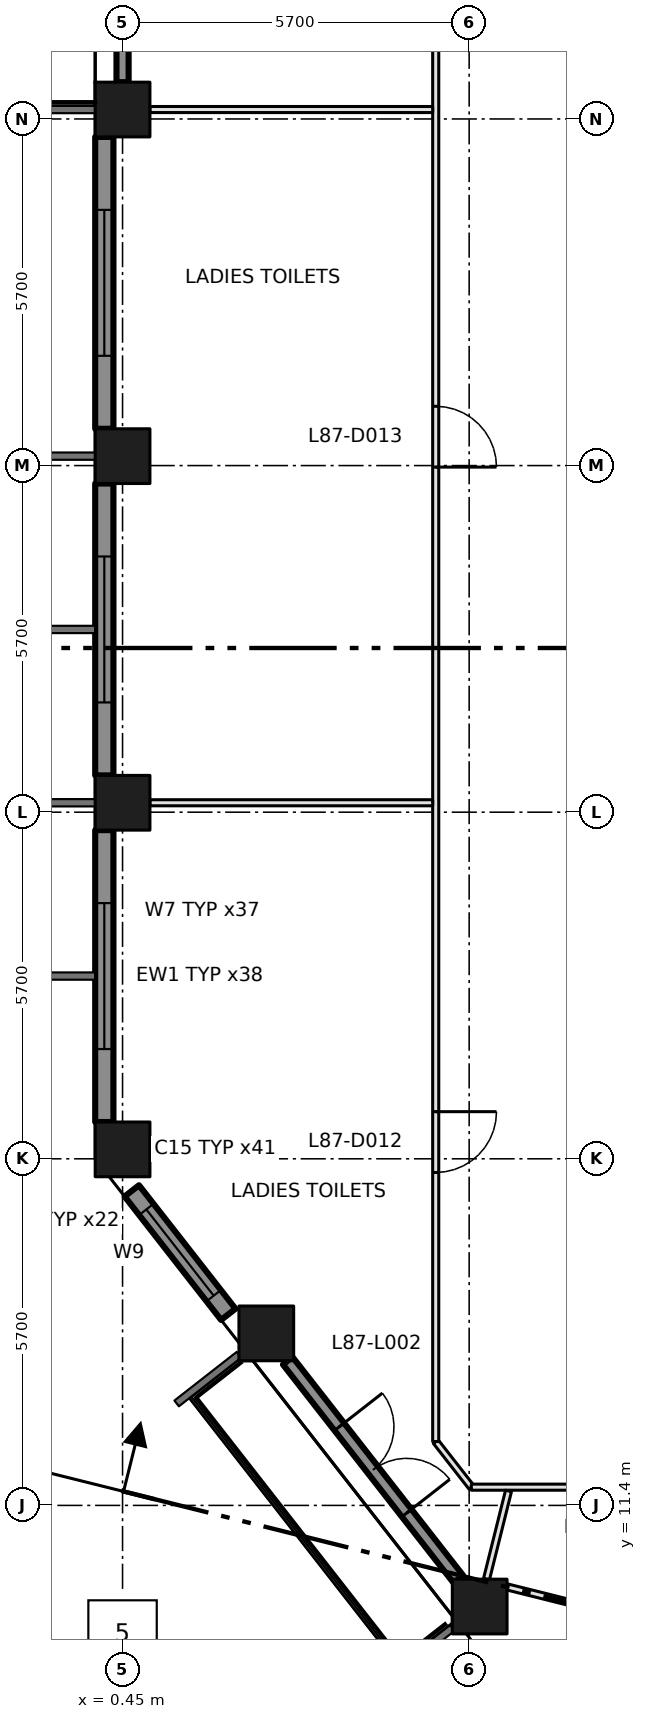
"""IFC4 building model, lengths in metres.
Left out: names, types, materials, properties, quantities, classifications, styles, units other than length and angle.
Written with IfcOpenShell. Run it as: python <this file> out.ifc"""

import sys

from ifc_helpers import new_model, si_unit, direction, frame, frame_2d, origin, origin_2d, place, context, subcontext, project, spatial, rectangle, extrude, element, fill, save


model = new_model("IFC4")
c1 = context("Model", 3, precision=1e-05, world=origin(), true_north=direction((0.0, 1.0)))
c2 = subcontext(c1, "Body", "Model", "MODEL_VIEW")
j1 = project(units=[si_unit("LENGTHUNIT", "METRE"), si_unit("PLANEANGLEUNIT", "RADIAN")], contexts=[c1])
p1 = place(None, origin())
s1 = spatial("IfcSite", under=j1, at=p1, CompositionType="ELEMENT")
p2 = place(p1, origin())
s2 = spatial("IfcBuilding", under=s1, at=p2, CompositionType="ELEMENT")
p3 = place(p2, frame((0.0, 0.0, 379.2)))
s3 = spatial("IfcBuildingStorey", under=s2, at=p3, CompositionType="ELEMENT", Elevation=379.2)
for number, where, z_axis, x_axis in (
    (1, (0.45, 17.255, 0.0), (0.0, 0.0, 1.0), (1.0, 0.0, 0.0)),
    (2, (0.45, 22.955, 0.0), (0.0, 0.0, 1.0), (1.0, 0.0, 0.0)),
    (3, (0.45, 28.655, 0.0), (0.0, 0.0, 1.0), (1.0, 0.0, 0.0)),
    (4, (0.45, 34.355, 0.0), (0.0, 0.0, 1.0), (1.0, 0.0, 0.0)),
    (5, (6.323, 9.737, 0.0), (0.0, 0.0, 1.0), (1.0, 0.0, 0.0)),
    (6, (2.814, 14.229, 0.0), (0.0, 0.0, 1.0), (1.0, 0.0, 0.0)),
):
    element("IfcColumn", number, at=place(p3, frame(where, z_axis=z_axis, x_axis=x_axis)), inside=s3, PredefinedType="COLUMN", context=c2, shape_type="SweptSolid", body=[
        extrude(rectangle(XDim=0.9, YDim=0.9, at=origin_2d()), origin(), (0.0, 0.0, 1.0), 4.2),
    ])
p4 = place(p3, frame((0.45, 39.605, 0.0), z_axis=(0.0, 0.0, 1.0), x_axis=(0.0, -1.0, 0.0)))
e7 = element("IfcWall", 7, at=p4, inside=s3, PredefinedType="SOLIDWALL", context=c2, shape_type="SweptSolid", body=[
    extrude(rectangle(XDim=4.8, YDim=0.2, at=frame_2d((2.4, 0.0))), origin(), (0.0, 0.0, 1.0), 3.2),
])
p5 = place(p4, frame((1.5, 0.0, 0.0)))
e8 = element("IfcOpeningElement", 8, at=p5, cuts=e7, PredefinedType="OPENING", context=c2, shape_type="SweptSolid", body=[
    extrude(rectangle(XDim=1.8, YDim=2.9, at=frame_2d((0.9, 1.45))), frame((0.0, 0.11, 0.0), z_axis=(0.0, -1.0, 0.0), x_axis=(1.0, 0.0, 0.0)), (0.0, 0.0, 1.0), 0.22),
])
p6 = place(p3, frame((0.15, 33.905, 0.0), z_axis=(0.0, 0.0, 1.0), x_axis=(0.0, -1.0, 0.0)))
e9 = element("IfcWall", 9, at=p6, inside=s3, PredefinedType="SOLIDWALL", context=c2, shape_type="SweptSolid", body=[
    extrude(rectangle(XDim=4.8, YDim=0.3, at=frame_2d((2.4, 0.0))), origin(), (0.0, 0.0, 1.0), 3.2),
])
p7 = place(p6, frame((1.2, 0.0, 0.8)))
e10 = element("IfcOpeningElement", 10, at=p7, cuts=e9, PredefinedType="OPENING", context=c2, shape_type="SweptSolid", body=[
    extrude(rectangle(XDim=2.4, YDim=2.1, at=frame_2d((1.2, 1.05))), frame((0.0, 0.16, 0.0), z_axis=(0.0, -1.0, 0.0), x_axis=(1.0, 0.0, 0.0)), (0.0, 0.0, 1.0), 0.32),
])
p8 = place(p3, frame((0.15, 28.205, 0.0), z_axis=(0.0, 0.0, 1.0), x_axis=(0.0, -1.0, 0.0)))
e11 = element("IfcWall", 11, at=p8, inside=s3, PredefinedType="SOLIDWALL", context=c2, shape_type="SweptSolid", body=[
    extrude(rectangle(XDim=4.8, YDim=0.3, at=frame_2d((2.4, 0.0))), origin(), (0.0, 0.0, 1.0), 3.2),
])
p9 = place(p8, frame((1.2, 0.0, 0.8)))
e12 = element("IfcOpeningElement", 12, at=p9, cuts=e11, PredefinedType="OPENING", context=c2, shape_type="SweptSolid", body=[
    extrude(rectangle(XDim=2.4, YDim=2.1, at=frame_2d((1.2, 1.05))), frame((0.0, 0.16, 0.0), z_axis=(0.0, -1.0, 0.0), x_axis=(1.0, 0.0, 0.0)), (0.0, 0.0, 1.0), 0.32),
])
p10 = place(p3, frame((0.15, 22.505, 0.0), z_axis=(0.0, 0.0, 1.0), x_axis=(0.0, -1.0, 0.0)))
e13 = element("IfcWall", 13, at=p10, inside=s3, PredefinedType="SOLIDWALL", context=c2, shape_type="SweptSolid", body=[
    extrude(rectangle(XDim=4.8, YDim=0.3, at=frame_2d((2.4, 0.0))), origin(), (0.0, 0.0, 1.0), 3.2),
])
p11 = place(p10, frame((1.2, 0.0, 0.8)))
e14 = element("IfcOpeningElement", 14, at=p11, cuts=e13, PredefinedType="OPENING", context=c2, shape_type="SweptSolid", body=[
    extrude(rectangle(XDim=2.4, YDim=2.1, at=frame_2d((1.2, 1.05))), frame((0.0, 0.16, 0.0), z_axis=(0.0, -1.0, 0.0), x_axis=(1.0, 0.0, 0.0)), (0.0, 0.0, 1.0), 0.32),
])
p12 = place(p3, frame((0.602, 16.573, 0.0), z_axis=(0.0, 0.0, 1.0), x_axis=(0.61568999437, -0.787988471256, 0.0)))
e15 = element("IfcWall", 15, at=p12, inside=s3, PredefinedType="SOLIDWALL", context=c2, shape_type="SweptSolid", body=[
    extrude(rectangle(XDim=2.577, YDim=0.3, at=frame_2d((1.289, 0.0))), origin(), (0.0, 0.0, 1.0), 3.2),
])
p13 = place(p12, frame((0.388, 0.0, 0.8)))
e16 = element("IfcOpeningElement", 16, at=p13, cuts=e15, PredefinedType="OPENING", context=c2, shape_type="SweptSolid", body=[
    extrude(rectangle(XDim=1.8, YDim=2.1, at=frame_2d((0.9, 1.05))), frame((0.0, 0.16, 0.0), z_axis=(0.0, -1.0, 0.0), x_axis=(1.0, 0.0, 0.0)), (0.0, 0.0, 1.0), 0.32),
])
p14 = place(p3, frame((3.166, 13.779, 0.0), z_axis=(0.0, 0.0, 1.0), x_axis=(0.615593109271, -0.788064162247, 0.0)))
e17 = element("IfcWall", 17, at=p14, inside=s3, PredefinedType="SOLIDWALL", context=c2, shape_type="SweptSolid", body=[
    extrude(rectangle(XDim=4.558, YDim=0.2, at=frame_2d((2.279, 0.0))), origin(), (0.0, 0.0, 1.0), 3.2),
])
p15 = place(p14, frame((1.378, 0.0, 0.0)))
e18 = element("IfcOpeningElement", 18, at=p15, cuts=e17, PredefinedType="OPENING", context=c2, shape_type="SweptSolid", body=[
    extrude(rectangle(XDim=1.8, YDim=2.9, at=frame_2d((0.9, 1.45))), frame((0.0, 0.11, 0.0), z_axis=(0.0, -1.0, 0.0), x_axis=(1.0, 0.0, 0.0)), (0.0, 0.0, 1.0), 0.22),
])
p16 = place(p3, frame((1.871, 13.276, 0.0), z_axis=(0.0, 0.0, 1.0), x_axis=(0.615632551218, -0.788033350741, 0.0)))
e19 = element("IfcWall", 19, at=p16, inside=s3, PredefinedType="SOLIDWALL", context=c2, shape_type="SweptSolid", body=[
    extrude(rectangle(XDim=5.36, YDim=0.4, at=frame_2d((2.68, 0.0))), origin(), (0.0, 0.0, 1.0), 0.3),
])
p17 = place(p3, frame((5.6, 12.45, 0.0), z_axis=(0.0, 0.0, 1.0), x_axis=(0.615644041972, -0.788024373725, 0.0)))
e20 = element("IfcWall", 20, at=p17, inside=s3, PredefinedType="PARTITIONING", context=c2, shape_type="SweptSolid", body=[
    extrude(rectangle(XDim=0.952, YDim=0.1, at=frame_2d((0.476, 0.0))), origin(), (0.0, 0.0, 1.0), 3.9),
])
p18 = place(p3, frame((5.6, 39.3, 0.0), z_axis=(0.0, 0.0, 1.0), x_axis=(0.0, -1.0, 0.0)))
e21 = element("IfcWall", 21, at=p18, inside=s3, PredefinedType="PARTITIONING", context=c2, shape_type="SweptSolid", body=[
    extrude(rectangle(XDim=26.85, YDim=0.1, at=frame_2d((13.425, 0.0))), origin(), (0.0, 0.0, 1.0), 3.9),
])
p19 = place(p18, frame((21.425, 0.0, 0.0)))
e22 = element("IfcOpeningElement", 22, at=p19, cuts=e21, PredefinedType="OPENING", context=c2, shape_type="SweptSolid", body=[
    extrude(rectangle(XDim=1.0, YDim=2.1, at=frame_2d((0.5, 1.05))), frame((0.0, 0.06, 0.0), z_axis=(0.0, -1.0, 0.0), x_axis=(1.0, 0.0, 0.0)), (0.0, 0.0, 1.0), 0.12),
])
p20 = place(p18, frame((9.825, 0.0, 0.0)))
e23 = element("IfcOpeningElement", 23, at=p20, cuts=e21, PredefinedType="OPENING", context=c2, shape_type="SweptSolid", body=[
    extrude(rectangle(XDim=1.0, YDim=2.1, at=frame_2d((0.5, 1.05))), frame((0.0, 0.06, 0.0), z_axis=(0.0, -1.0, 0.0), x_axis=(1.0, 0.0, 0.0)), (0.0, 0.0, 1.0), 0.12),
])
p21 = place(p3, frame((6.186, 11.7, 0.0), z_axis=(0.0, 0.0, 1.0), x_axis=(1.0, 0.0, 0.0)))
e24 = element("IfcWall", 24, at=p21, inside=s3, PredefinedType="PARTITIONING", context=c2, shape_type="SweptSolid", body=[
    extrude(rectangle(XDim=3.714, YDim=0.1, at=frame_2d((1.857, 0.0))), origin(), (0.0, 0.0, 1.0), 3.9),
])
p22 = place(p21, frame((1.791, 0.0, 0.0)))
e25 = element("IfcOpeningElement", 25, at=p22, cuts=e24, PredefinedType="OPENING", context=c2, shape_type="SweptSolid", body=[
    extrude(rectangle(XDim=1.0, YDim=2.1, at=frame_2d((0.5, 1.05))), frame((0.0, 0.06, 0.0), z_axis=(0.0, -1.0, 0.0), x_axis=(1.0, 0.0, 0.0)), (0.0, 0.0, 1.0), 0.12),
])
for number, where, z_axis, x_axis in (
    (26, (5.55, 22.955, 0.0), (0.0, 0.0, 1.0), (-1.0, 0.0, 0.0)),
    (27, (5.55, 34.355, 0.0), (0.0, 0.0, 1.0), (-1.0, 0.0, 0.0)),
):
    element("IfcWall", number, at=place(p3, frame(where, z_axis=z_axis, x_axis=x_axis)), inside=s3, PredefinedType="PARTITIONING", context=c2, shape_type="SweptSolid", body=[
        extrude(rectangle(XDim=4.65, YDim=0.1, at=frame_2d((2.325, 0.0))), origin(), (0.0, 0.0, 1.0), 3.9),
    ])
p23 = place(p3, frame((6.797, 11.638, 0.0), z_axis=(0.0, 0.0, 1.0), x_axis=(-0.242113049408, -0.970248046278, 0.0)))
e28 = element("IfcWall", 28, at=p23, inside=s3, PredefinedType="PARTITIONING", context=c2, shape_type="SweptSolid", body=[
    extrude(rectangle(XDim=1.495, YDim=0.1, at=frame_2d((0.748, 0.0))), origin(), (0.0, 0.0, 1.0), 3.9),
])
p24 = place(p3, frame((8.72, 9.574, 0.0), z_axis=(0.0, 0.0, 1.0), x_axis=(-0.970221168815, 0.24222073318, 0.0)))
e29 = element("IfcWall", 29, at=p24, inside=s3, PredefinedType="PARTITIONING", context=c2, shape_type="SweptSolid", body=[
    extrude(rectangle(XDim=2.007, YDim=0.1, at=frame_2d((1.003, 0.0))), origin(), (0.0, 0.0, 1.0), 3.9),
])
p25 = place(p7, origin())
e30 = element("IfcWindow", 30, at=p25, inside=s3, PartitioningType="DOUBLE_PANEL_VERTICAL", PredefinedType="WINDOW", context=c2, shape_type="SweptSolid", body=[
    extrude(rectangle(XDim=2.4, YDim=2.1, at=frame_2d((1.2, 1.05))), frame((0.0, 0.03, 0.0), z_axis=(0.0, -1.0, 0.0), x_axis=(1.0, 0.0, 0.0)), (0.0, 0.0, 1.0), 0.06),
])
fill(e10, e30)
p26 = place(p9, origin())
e31 = element("IfcWindow", 31, at=p26, inside=s3, PartitioningType="DOUBLE_PANEL_VERTICAL", PredefinedType="WINDOW", context=c2, shape_type="SweptSolid", body=[
    extrude(rectangle(XDim=2.4, YDim=2.1, at=frame_2d((1.2, 1.05))), frame((0.0, 0.03, 0.0), z_axis=(0.0, -1.0, 0.0), x_axis=(1.0, 0.0, 0.0)), (0.0, 0.0, 1.0), 0.06),
])
fill(e12, e31)
p27 = place(p11, origin())
e32 = element("IfcWindow", 32, at=p27, inside=s3, PartitioningType="DOUBLE_PANEL_VERTICAL", PredefinedType="WINDOW", context=c2, shape_type="SweptSolid", body=[
    extrude(rectangle(XDim=2.4, YDim=2.1, at=frame_2d((1.2, 1.05))), frame((0.0, 0.03, 0.0), z_axis=(0.0, -1.0, 0.0), x_axis=(1.0, 0.0, 0.0)), (0.0, 0.0, 1.0), 0.06),
])
fill(e14, e32)
p28 = place(p13, origin())
e33 = element("IfcWindow", 33, at=p28, inside=s3, PartitioningType="DOUBLE_PANEL_VERTICAL", PredefinedType="WINDOW", context=c2, shape_type="SweptSolid", body=[
    extrude(rectangle(XDim=1.8, YDim=2.1, at=frame_2d((0.9, 1.05))), frame((0.0, 0.03, 0.0), z_axis=(0.0, -1.0, 0.0), x_axis=(1.0, 0.0, 0.0)), (0.0, 0.0, 1.0), 0.06),
])
fill(e16, e33)
p29 = place(p15, origin())
e34 = element("IfcDoor", 34, at=p29, inside=s3, OperationType="DOUBLE_DOOR_SINGLE_SWING", PredefinedType="DOOR", context=c2, shape_type="SweptSolid", body=[
    extrude(rectangle(XDim=1.8, YDim=2.9, at=frame_2d((0.9, 1.45))), frame((0.0, 0.025, 0.0), z_axis=(0.0, -1.0, 0.0), x_axis=(1.0, 0.0, 0.0)), (0.0, 0.0, 1.0), 0.05),
])
fill(e18, e34)
p30 = place(p19, origin())
e35 = element("IfcDoor", 35, at=p30, inside=s3, OperationType="SINGLE_SWING_LEFT", PredefinedType="DOOR", context=c2, shape_type="SweptSolid", body=[
    extrude(rectangle(XDim=1.0, YDim=2.1, at=frame_2d((0.5, 1.05))), frame((0.0, 0.025, 0.0), z_axis=(0.0, -1.0, 0.0), x_axis=(1.0, 0.0, 0.0)), (0.0, 0.0, 1.0), 0.05),
])
fill(e22, e35)
p31 = place(p20, origin())
e36 = element("IfcDoor", 36, at=p31, inside=s3, OperationType="SINGLE_SWING_RIGHT", PredefinedType="DOOR", context=c2, shape_type="SweptSolid", body=[
    extrude(rectangle(XDim=1.0, YDim=2.1, at=frame_2d((0.5, 1.05))), frame((0.0, 0.025, 0.0), z_axis=(0.0, -1.0, 0.0), x_axis=(1.0, 0.0, 0.0)), (0.0, 0.0, 1.0), 0.05),
])
fill(e23, e36)
save(model, sys.argv[1])
